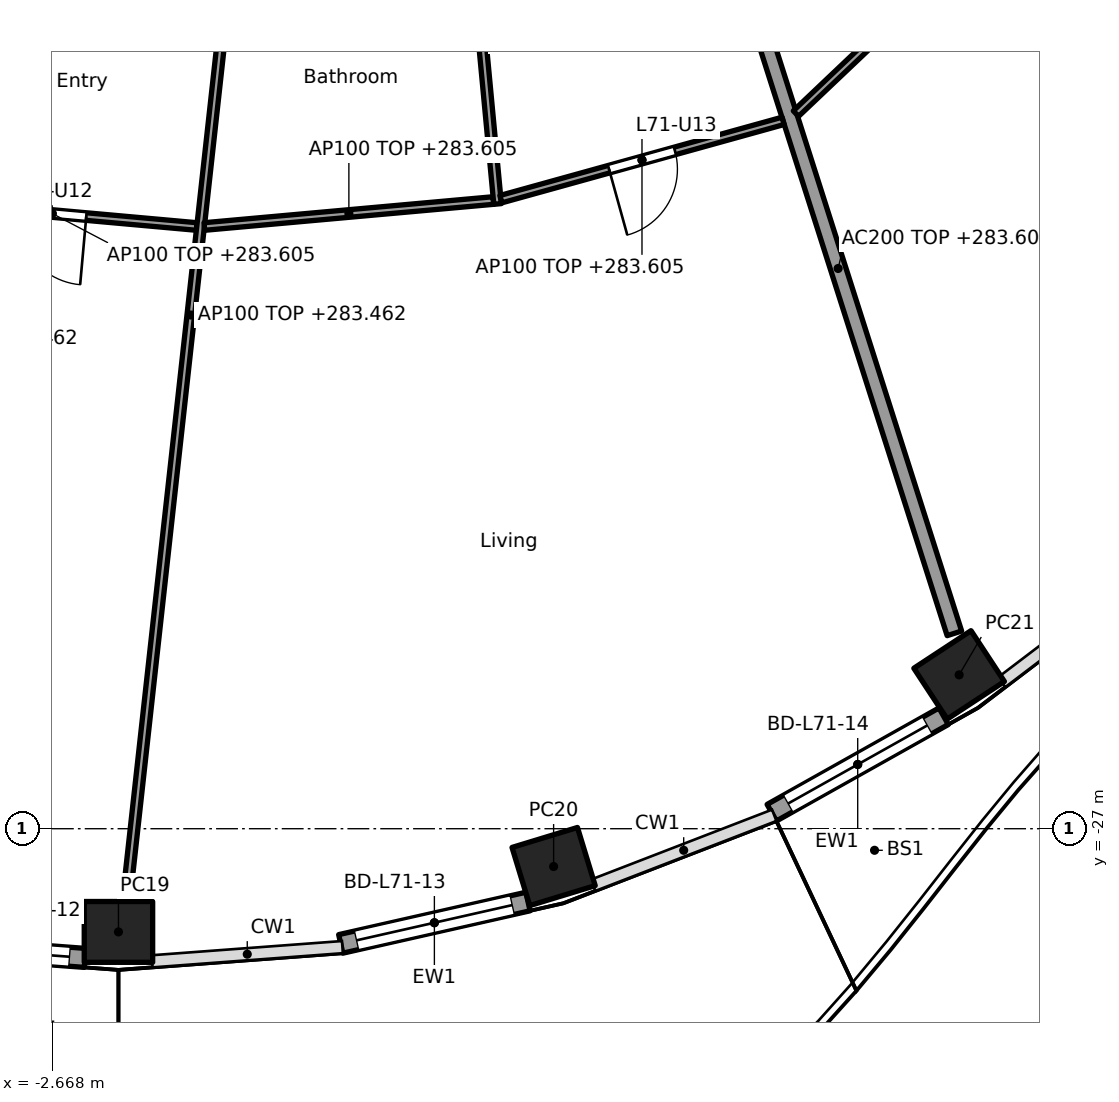
"""IFC4 building model, lengths in metres.
Left out: names, types, materials, properties, quantities, classifications, styles, units other than length and angle.
Written with IfcOpenShell. Run it as: python <this file> out.ifc"""

import sys

from ifc_helpers import new_model, si_unit, direction, frame, frame_2d, origin, origin_2d, place, context, subcontext, project, spatial, rectangle, hollow_rectangle, extrude, element, fill, save


model = new_model("IFC4")
c1 = context("Model", 3, precision=1e-05, world=origin(), true_north=direction((0.0, 1.0)))
c2 = subcontext(c1, "Body", "Model", "MODEL_VIEW")
j1 = project(units=[si_unit("LENGTHUNIT", "METRE"), si_unit("PLANEANGLEUNIT", "RADIAN")], contexts=[c1])
p1 = place(None, origin())
s1 = spatial("IfcSite", under=j1, at=p1, CompositionType="ELEMENT")
p2 = place(p1, origin())
s2 = spatial("IfcBuilding", under=s1, at=p2, CompositionType="ELEMENT")
p3 = place(p2, frame((0.0, 0.0, 280.7)))
s3 = spatial("IfcBuildingStorey", under=s2, at=p3, CompositionType="ELEMENT", Elevation=280.7)
for number, where, z_axis, x_axis in (
    (1, (-1.8, -28.358, 0.0), (0.0, 0.0, 1.0), (1.0, 0.0, 0.0)),
    (2, (3.925, -27.498, 0.0), (0.0, 0.0, 1.0), (0.957, 0.292, 0.0)),
    (3, (9.26, -24.976, 0.0), (0.0, 0.0, 1.0), (0.836, 0.549, 0.0)),
):
    element("IfcColumn", number, at=place(p3, frame(where, z_axis=z_axis, x_axis=x_axis)), inside=s3, PredefinedType="COLUMN", context=c2, shape_type="SweptSolid", body=[
        extrude(hollow_rectangle(XDim=0.9, YDim=0.8, WallThickness=0.028, at=origin_2d()), origin(), (0.0, 0.0, 1.0), 3.7),
    ])
p4 = place(p3, frame((-2.24, -28.699, 0.0), z_axis=(0.0, 0.0, 1.0), x_axis=(-0.997236355794, 0.074294351616, 0.0)))
e4 = element("IfcWall", 4, at=p4, inside=s3, PredefinedType="SOLIDWALL", context=c2, shape_type="SweptSolid", body=[
    extrude(rectangle(XDim=2.51, YDim=0.25, at=frame_2d((1.255, 0.0))), origin(), (0.0, 0.0, 1.0), 3.44),
])
p5 = place(p4, frame((0.205, 0.0, 0.0)))
e5 = element("IfcOpeningElement", 5, at=p5, cuts=e4, PredefinedType="OPENING", context=c2, shape_type="SweptSolid", body=[
    extrude(rectangle(XDim=2.1, YDim=2.4, at=frame_2d((1.05, 1.2))), frame((0.0, 0.135, 0.0), z_axis=(0.0, -1.0, 0.0), x_axis=(1.0, 0.0, 0.0)), (0.0, 0.0, 1.0), 0.27),
])
p6 = place(p3, frame((3.588, -27.958, 0.0), z_axis=(0.0, 0.0, 1.0), x_axis=(-0.97531487046, -0.22081871175, 0.0)))
e6 = element("IfcWall", 6, at=p6, inside=s3, PredefinedType="SOLIDWALL", context=c2, shape_type="SweptSolid", body=[
    extrude(rectangle(XDim=2.525, YDim=0.25, at=frame_2d((1.263, 0.0))), origin(), (0.0, 0.0, 1.0), 3.44),
])
p7 = place(p6, frame((0.213, 0.0, 0.0)))
e7 = element("IfcOpeningElement", 7, at=p7, cuts=e6, PredefinedType="OPENING", context=c2, shape_type="SweptSolid", body=[
    extrude(rectangle(XDim=2.1, YDim=2.4, at=frame_2d((1.05, 1.2))), frame((0.0, 0.135, 0.0), z_axis=(0.0, -1.0, 0.0), x_axis=(1.0, 0.0, 0.0)), (0.0, 0.0, 1.0), 0.27),
])
p8 = place(p3, frame((9.056, -25.521, 0.0), z_axis=(0.0, 0.0, 1.0), x_axis=(-0.872093060299, -0.489340059855, 0.0)))
e8 = element("IfcWall", 8, at=p8, inside=s3, PredefinedType="SOLIDWALL", context=c2, shape_type="SweptSolid", body=[
    extrude(rectangle(XDim=2.593, YDim=0.25, at=frame_2d((1.296, 0.0))), origin(), (0.0, 0.0, 1.0), 3.44),
])
p9 = place(p8, frame((0.247, 0.0, 0.0)))
e9 = element("IfcOpeningElement", 9, at=p9, cuts=e8, PredefinedType="OPENING", context=c2, shape_type="SweptSolid", body=[
    extrude(rectangle(XDim=2.1, YDim=2.4, at=frame_2d((1.05, 1.2))), frame((0.0, 0.135, 0.0), z_axis=(0.0, -1.0, 0.0), x_axis=(1.0, 0.0, 0.0)), (0.0, 0.0, 1.0), 0.27),
])
p10 = place(p3, frame((6.138, -14.83, 0.0), z_axis=(0.0, 0.0, 1.0), x_axis=(0.303653679037, -0.952782474234, 0.0)))
e10 = element("IfcWall", 10, at=p10, inside=s3, PredefinedType="PARTITIONING", context=c2, shape_type="SweptSolid", body=[
    extrude(rectangle(XDim=10.076, YDim=0.2, at=frame_2d((5.038, 0.0))), origin(), (0.0, 0.0, 1.0), 2.905),
])
p11 = place(p3, frame((-2.633, -12.66, 0.0), z_axis=(0.0, 0.0, 1.0), x_axis=(-0.311432955908, -0.950268127412, 0.0)))
e11 = element("IfcWall", 11, at=p11, inside=s3, PredefinedType="PARTITIONING", context=c2, shape_type="SweptSolid", body=[
    extrude(rectangle(XDim=15.074, YDim=0.1, at=frame_2d((7.537, 0.0))), origin(), (0.0, 0.0, 1.0), 2.762),
])
p12 = place(p11, frame((0.829, 0.0, 0.0)))
e12 = element("IfcOpeningElement", 12, at=p12, cuts=e11, PredefinedType="OPENING", context=c2, shape_type="SweptSolid", body=[
    extrude(rectangle(XDim=0.9, YDim=2.1, at=frame_2d((0.45, 1.05))), frame((0.0, 0.06, 0.0), z_axis=(0.0, -1.0, 0.0), x_axis=(1.0, 0.0, 0.0)), (0.0, 0.0, 1.0), 0.12),
])
p13 = place(p3, frame((-4.573, -18.736, 0.0), z_axis=(0.0, 0.0, 1.0), x_axis=(0.995986472869, -0.089503887414, 0.0)))
e13 = element("IfcWall", 13, at=p13, inside=s3, PredefinedType="PARTITIONING", context=c2, shape_type="SweptSolid", body=[
    extrude(rectangle(XDim=3.819, YDim=0.1, at=frame_2d((1.909, 0.0))), origin(), (0.0, 0.0, 1.0), 2.905),
])
p14 = place(p13, frame((1.459, 0.0, 0.0)))
e14 = element("IfcOpeningElement", 14, at=p14, cuts=e13, PredefinedType="OPENING", context=c2, shape_type="SweptSolid", body=[
    extrude(rectangle(XDim=0.9, YDim=2.1, at=frame_2d((0.45, 1.05))), frame((0.0, 0.06, 0.0), z_axis=(0.0, -1.0, 0.0), x_axis=(1.0, 0.0, 0.0)), (0.0, 0.0, 1.0), 0.12),
])
p15 = place(p3, frame((-0.011, -12.664, 0.0), z_axis=(0.0, 0.0, 1.0), x_axis=(-0.109805889692, -0.993953050495, 0.0)))
e15 = element("IfcWall", 15, at=p15, inside=s3, PredefinedType="PARTITIONING", context=c2, shape_type="SweptSolid", body=[
    extrude(rectangle(XDim=15.248, YDim=0.1, at=frame_2d((7.624, 0.0))), origin(), (0.0, 0.0, 1.0), 2.762),
])
p16 = place(p15, frame((2.778, 0.0, 0.0)))
e16 = element("IfcOpeningElement", 16, at=p16, cuts=e15, PredefinedType="OPENING", context=c2, shape_type="SweptSolid", body=[
    extrude(rectangle(XDim=0.9, YDim=2.1, at=frame_2d((0.45, 1.05))), frame((0.0, 0.06, 0.0), z_axis=(0.0, -1.0, 0.0), x_axis=(1.0, 0.0, 0.0)), (0.0, 0.0, 1.0), 0.12),
])
p17 = place(p3, frame((-0.67, -19.077, 0.0), z_axis=(0.0, 0.0, 1.0), x_axis=(0.995986472869, 0.089503887414, 0.0)))
e17 = element("IfcWall", 17, at=p17, inside=s3, PredefinedType="PARTITIONING", context=c2, shape_type="SweptSolid", body=[
    extrude(rectangle(XDim=3.819, YDim=0.1, at=frame_2d((1.909, 0.0))), origin(), (0.0, 0.0, 1.0), 2.905),
])
p18 = place(p3, frame((2.612, -12.664, 0.0), z_axis=(0.0, 0.0, 1.0), x_axis=(0.093781393779, -0.995592813444, 0.0)))
e18 = element("IfcWall", 18, at=p18, inside=s3, PredefinedType="PARTITIONING", context=c2, shape_type="SweptSolid", body=[
    extrude(rectangle(XDim=6.144, YDim=0.1, at=frame_2d((3.072, 0.0))), origin(), (0.0, 0.0, 1.0), 2.762),
])
p19 = place(p18, frame((2.597, 0.0, 0.0)))
e19 = element("IfcOpeningElement", 19, at=p19, cuts=e18, PredefinedType="OPENING", context=c2, shape_type="SweptSolid", body=[
    extrude(rectangle(XDim=0.9, YDim=2.1, at=frame_2d((0.45, 1.05))), frame((0.0, 0.06, 0.0), z_axis=(0.0, -1.0, 0.0), x_axis=(1.0, 0.0, 0.0)), (0.0, 0.0, 1.0), 0.12),
])
p20 = place(p3, frame((3.231, -18.718, 0.0), z_axis=(0.0, 0.0, 1.0), x_axis=(0.963606817151, 0.267323590318, 0.0)))
e20 = element("IfcWall", 20, at=p20, inside=s3, PredefinedType="PARTITIONING", context=c2, shape_type="SweptSolid", body=[
    extrude(rectangle(XDim=3.853, YDim=0.1, at=frame_2d((1.927, 0.0))), origin(), (0.0, 0.0, 1.0), 2.905),
])
p21 = place(p20, frame((1.477, 0.0, 0.0)))
e21 = element("IfcOpeningElement", 21, at=p21, cuts=e20, PredefinedType="OPENING", context=c2, shape_type="SweptSolid", body=[
    extrude(rectangle(XDim=0.9, YDim=2.1, at=frame_2d((0.45, 1.05))), frame((0.0, 0.06, 0.0), z_axis=(0.0, -1.0, 0.0), x_axis=(1.0, 0.0, 0.0)), (0.0, 0.0, 1.0), 0.12),
])
p22 = place(p3, frame((7.113, -17.592, 0.0), z_axis=(0.0, 0.0, 1.0), x_axis=(0.725433932329, 0.688291805723, 0.0)))
e22 = element("IfcWall", 22, at=p22, inside=s3, PredefinedType="PARTITIONING", context=c2, shape_type="SweptSolid", body=[
    extrude(rectangle(XDim=4.305, YDim=0.1, at=frame_2d((2.153, 0.0))), origin(), (0.0, 0.0, 1.0), 2.905),
])
p23 = place(p3, frame((7.708, -10.198, 0.0), z_axis=(0.0, 0.0, 1.0), x_axis=(0.503839015963, -0.863797572347, 0.0)))
e23 = element("IfcWall", 23, at=p23, inside=s3, PredefinedType="PARTITIONING", context=c2, shape_type="SweptSolid", body=[
    extrude(rectangle(XDim=11.856, YDim=0.1, at=frame_2d((5.928, 0.0))), origin(), (0.0, 0.0, 1.0), 2.762),
])
p24 = place(p23, frame((2.095, 0.0, 0.0)))
e24 = element("IfcOpeningElement", 24, at=p24, cuts=e23, PredefinedType="OPENING", context=c2, shape_type="SweptSolid", body=[
    extrude(rectangle(XDim=0.9, YDim=2.1, at=frame_2d((0.45, 1.05))), frame((0.0, 0.06, 0.0), z_axis=(0.0, -1.0, 0.0), x_axis=(1.0, 0.0, 0.0)), (0.0, 0.0, 1.0), 0.12),
])
p25 = place(p23, frame((8.023, 0.0, 0.0)))
e25 = element("IfcOpeningElement", 25, at=p25, cuts=e23, PredefinedType="OPENING", context=c2, shape_type="SweptSolid", body=[
    extrude(rectangle(XDim=0.9, YDim=2.1, at=frame_2d((0.45, 1.05))), frame((0.0, 0.06, 0.0), z_axis=(0.0, -1.0, 0.0), x_axis=(1.0, 0.0, 0.0)), (0.0, 0.0, 1.0), 0.12),
])
p26 = place(p5, origin())
e26 = element("IfcDoor", 26, at=p26, inside=s3, OperationType="SLIDING_TO_LEFT", PredefinedType="DOOR", context=c2, shape_type="SweptSolid", body=[
    extrude(rectangle(XDim=2.1, YDim=2.4, at=frame_2d((1.05, 1.2))), frame((0.0, 0.025, 0.0), z_axis=(0.0, -1.0, 0.0), x_axis=(1.0, 0.0, 0.0)), (0.0, 0.0, 1.0), 0.05),
])
fill(e5, e26)
p27 = place(p7, origin())
e27 = element("IfcDoor", 27, at=p27, inside=s3, OperationType="SLIDING_TO_LEFT", PredefinedType="DOOR", context=c2, shape_type="SweptSolid", body=[
    extrude(rectangle(XDim=2.1, YDim=2.4, at=frame_2d((1.05, 1.2))), frame((0.0, 0.025, 0.0), z_axis=(0.0, -1.0, 0.0), x_axis=(1.0, 0.0, 0.0)), (0.0, 0.0, 1.0), 0.05),
])
fill(e7, e27)
p28 = place(p9, origin())
e28 = element("IfcDoor", 28, at=p28, inside=s3, OperationType="SLIDING_TO_LEFT", PredefinedType="DOOR", context=c2, shape_type="SweptSolid", body=[
    extrude(rectangle(XDim=2.1, YDim=2.4, at=frame_2d((1.05, 1.2))), frame((0.0, 0.025, 0.0), z_axis=(0.0, -1.0, 0.0), x_axis=(1.0, 0.0, 0.0)), (0.0, 0.0, 1.0), 0.05),
])
fill(e9, e28)
p29 = place(p14, frame((0.9, 0.0, 0.0), x_axis=(-1.0, 0.0, 0.0)))
e29 = element("IfcDoor", 29, at=p29, inside=s3, OperationType="SINGLE_SWING_LEFT", PredefinedType="DOOR", context=c2, shape_type="SweptSolid", body=[
    extrude(rectangle(XDim=0.9, YDim=2.1, at=frame_2d((0.45, 1.05))), frame((0.0, 0.025, 0.0), z_axis=(0.0, -1.0, 0.0), x_axis=(1.0, 0.0, 0.0)), (0.0, 0.0, 1.0), 0.05),
])
fill(e14, e29)
p30 = place(p21, frame((0.9, 0.0, 0.0), x_axis=(-1.0, 0.0, 0.0)))
e30 = element("IfcDoor", 30, at=p30, inside=s3, OperationType="SINGLE_SWING_RIGHT", PredefinedType="DOOR", context=c2, shape_type="SweptSolid", body=[
    extrude(rectangle(XDim=0.9, YDim=2.1, at=frame_2d((0.45, 1.05))), frame((0.0, 0.025, 0.0), z_axis=(0.0, -1.0, 0.0), x_axis=(1.0, 0.0, 0.0)), (0.0, 0.0, 1.0), 0.05),
])
fill(e21, e30)
save(model, sys.argv[1])
